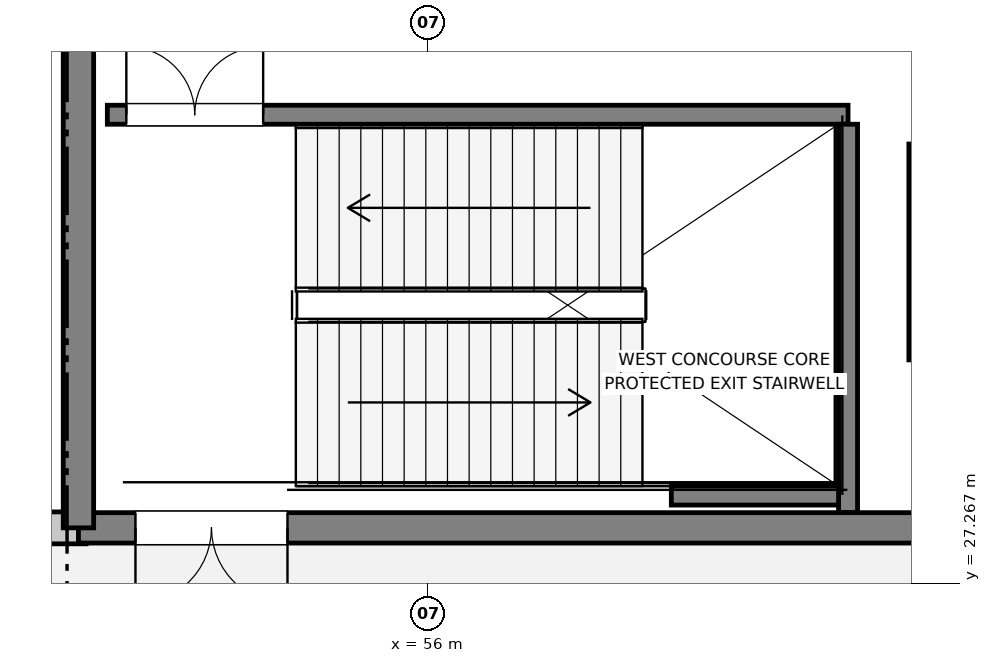
"""IFC4 building model, lengths in metres.
Left out: names, types, materials, properties, quantities, classifications, styles, units other than length and angle.
Written with IfcOpenShell. Run it as: python <this file> out.ifc"""

import sys

from ifc_helpers import new_model, si_unit, direction, frame, frame_2d, origin, place, context, subcontext, project, spatial, rectangle, extrude, element, fill, save


model = new_model("IFC4")
c1 = context("Model", 3, precision=1e-05, world=origin(), true_north=direction((0.0, 1.0)))
c2 = subcontext(c1, "Body", "Model", "MODEL_VIEW")
j1 = project(units=[si_unit("LENGTHUNIT", "METRE"), si_unit("PLANEANGLEUNIT", "RADIAN")], contexts=[c1])
p1 = place(None, origin())
s1 = spatial("IfcSite", under=j1, at=p1, CompositionType="ELEMENT")
p2 = place(p1, origin())
s2 = spatial("IfcBuilding", under=s1, at=p2, CompositionType="ELEMENT")
p3 = place(p2, origin())
s3 = spatial("IfcBuildingStorey", under=s2, at=p3, CompositionType="ELEMENT", Elevation=0.0)
p4 = place(p3, frame((49.8, 28.0, 0.0), z_axis=(0.0, 0.0, 1.0), x_axis=(1.0, 0.0, 0.0)))
e1 = element("IfcWall", 1, at=p4, inside=s3, PredefinedType="STANDARD", context=c2, shape_type="SweptSolid", body=[
    extrude(rectangle(XDim=1.7, YDim=0.42, at=frame_2d((0.85, 0.0))), origin(), (0.0, 0.0, 1.0), 5.62),
])
p5 = place(p3, frame((62.45, 33.05, 0.0), z_axis=(0.0, 0.0, 1.0), x_axis=(0.0, -1.0, 0.0)))
e2 = element("IfcWall", 2, at=p5, inside=s3, PredefinedType="SOLIDWALL", context=c2, shape_type="SweptSolid", body=[
    extrude(rectangle(XDim=2.84, YDim=0.25, at=frame_2d((1.42, 0.0))), origin(), (0.0, 0.0, 1.0), 5.64),
])
p6 = place(p3, frame((51.78, 33.435, 0.0), z_axis=(0.0, 0.0, 1.0), x_axis=(1.0, 0.0, 0.0)))
e3 = element("IfcWall", 3, at=p6, inside=s3, PredefinedType="SOLIDWALL", context=c2, shape_type="SweptSolid", body=[
    extrude(rectangle(XDim=9.745, YDim=0.25, at=frame_2d((4.872, 0.0))), origin(), (0.0, 0.0, 1.0), 5.62),
])
p7 = place(p6, frame((0.25, 0.0, 0.0)))
e4 = element("IfcOpeningElement", 4, at=p7, cuts=e3, PredefinedType="OPENING", context=c2, shape_type="SweptSolid", body=[
    extrude(rectangle(XDim=1.8, YDim=2.25, at=frame_2d((0.9, 1.125))), frame((0.0, 0.135, 0.0), z_axis=(0.0, -1.0, 0.0), x_axis=(1.0, 0.0, 0.0)), (0.0, 0.0, 1.0), 0.27),
])
p8 = place(p3, frame((61.525, 28.2, 0.0), z_axis=(0.0, 0.0, 1.0), x_axis=(0.0, 1.0, 0.0)))
e5 = element("IfcWall", 5, at=p8, inside=s3, PredefinedType="SOLIDWALL", context=c2, shape_type="SweptSolid", body=[
    extrude(rectangle(XDim=5.11, YDim=0.25, at=frame_2d((2.555, 0.0))), origin(), (0.0, 0.0, 1.0), 5.62),
])
p9 = place(p3, frame((59.2, 28.425, 0.0), z_axis=(0.0, 0.0, 1.0), x_axis=(1.0, 0.0, 0.0)))
e6 = element("IfcWall", 6, at=p9, inside=s3, PredefinedType="SOLIDWALL", context=c2, shape_type="SweptSolid", body=[
    extrude(rectangle(XDim=2.2, YDim=0.25, at=frame_2d((1.1, 0.0))), origin(), (0.0, 0.0, 1.0), 5.62),
])
p10 = place(p3, frame((51.4, 28.0, 0.0), z_axis=(0.0, 0.0, 1.0), x_axis=(1.0, 0.0, 0.0)))
e7 = element("IfcWall", 7, at=p10, inside=s3, PredefinedType="SHEAR", context=c2, shape_type="SweptSolid", body=[
    extrude(rectangle(XDim=17.4, YDim=0.4, at=frame_2d((8.7, 0.0))), origin(), (0.0, 0.0, 1.0), 5.64),
])
p11 = place(p10, frame((0.75, 0.0, 0.0)))
e8 = element("IfcOpeningElement", 8, at=p11, cuts=e7, PredefinedType="OPENING", context=c2, shape_type="SweptSolid", body=[
    extrude(rectangle(XDim=2.0, YDim=2.4, at=frame_2d((1.0, 1.2))), frame((0.0, 0.21, 0.0), z_axis=(0.0, -1.0, 0.0), x_axis=(1.0, 0.0, 0.0)), (0.0, 0.0, 1.0), 0.42),
])
p12 = place(p3, frame((51.4, 37.0, 0.0), z_axis=(0.0, 0.0, 1.0), x_axis=(0.0, -1.0, 0.0)))
e9 = element("IfcWall", 9, at=p12, inside=s3, PredefinedType="SHEAR", context=c2, shape_type="SweptSolid", body=[
    extrude(rectangle(XDim=9.0, YDim=0.4, at=frame_2d((4.5, 0.0))), origin(), (0.0, 0.0, 1.0), 5.64),
])
p13 = place(p7, origin())
e10 = element("IfcDoor", 10, at=p13, inside=s3, OperationType="DOUBLE_DOOR_SINGLE_SWING", PredefinedType="DOOR", context=c2, shape_type="SweptSolid", body=[
    extrude(rectangle(XDim=1.8, YDim=2.25, at=frame_2d((0.9, 1.125))), frame((0.0, 0.025, 0.0), z_axis=(0.0, -1.0, 0.0), x_axis=(1.0, 0.0, 0.0)), (0.0, 0.0, 1.0), 0.05),
])
fill(e4, e10)
p14 = place(p11, frame((2.0, 0.0, 0.0), z_axis=(0.0, 0.0, 1.0), x_axis=(-1.0, 0.0, 0.0)))
e11 = element("IfcDoor", 11, at=p14, inside=s3, OperationType="DOUBLE_DOOR_SINGLE_SWING", PredefinedType="DOOR", context=c2, shape_type="SweptSolid", body=[
    extrude(rectangle(XDim=2.0, YDim=2.4, at=frame_2d((1.0, 1.2))), frame((0.0, 0.025, 0.0), z_axis=(0.0, -1.0, 0.0), x_axis=(1.0, 0.0, 0.0)), (0.0, 0.0, 1.0), 0.05),
])
fill(e8, e11)
save(model, sys.argv[1])
